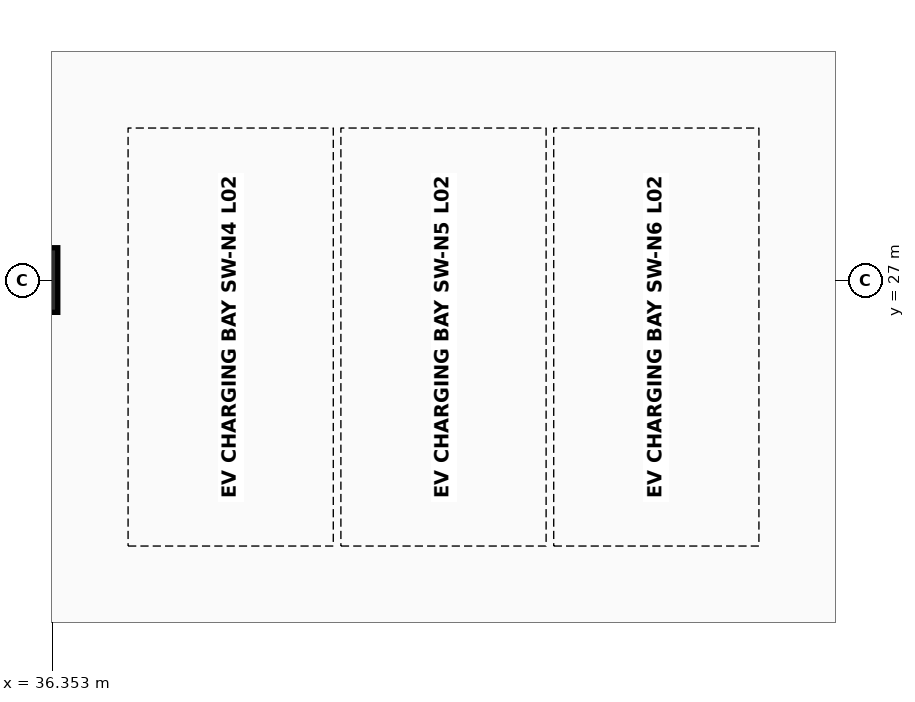
"""IFC4 building model, lengths in metres.
Left out: names, types, materials, properties, quantities, classifications, styles, units other than length and angle.
Written with IfcOpenShell. Run it as: python <this file> out.ifc"""

import sys

from ifc_helpers import new_model, si_unit, direction, frame, origin, origin_2d, place, context, subcontext, project, spatial, rectangle, extrude, element, save


model = new_model("IFC4")
c1 = context("Model", 3, precision=1e-05, world=origin(), true_north=direction((0.0, 1.0)))
c2 = subcontext(c1, "Body", "Model", "MODEL_VIEW")
j1 = project(units=[si_unit("LENGTHUNIT", "METRE"), si_unit("PLANEANGLEUNIT", "RADIAN")], contexts=[c1])
p1 = place(None, origin())
s1 = spatial("IfcSite", under=j1, at=p1, CompositionType="ELEMENT")
p2 = place(p1, origin())
s2 = spatial("IfcBuilding", under=s1, at=p2, CompositionType="ELEMENT")
p3 = place(p2, frame((0.0, 0.0, 9.6)))
s3 = spatial("IfcBuildingStorey", under=s2, at=p3, CompositionType="ELEMENT", Elevation=9.6)
p4 = place(p3, frame((36.0, 27.0, 0.0), z_axis=(0.0, 0.0, 1.0), x_axis=(1.0, 0.0, 0.0)))
e1 = element("IfcColumn", 1, at=p4, inside=s3, PredefinedType="COLUMN", context=c2, shape_type="SweptSolid", body=[
    extrude(rectangle(XDim=0.85, YDim=0.85, at=origin_2d()), origin(), (0.0, 0.0, 1.0), 3.8),
])
save(model, sys.argv[1])
